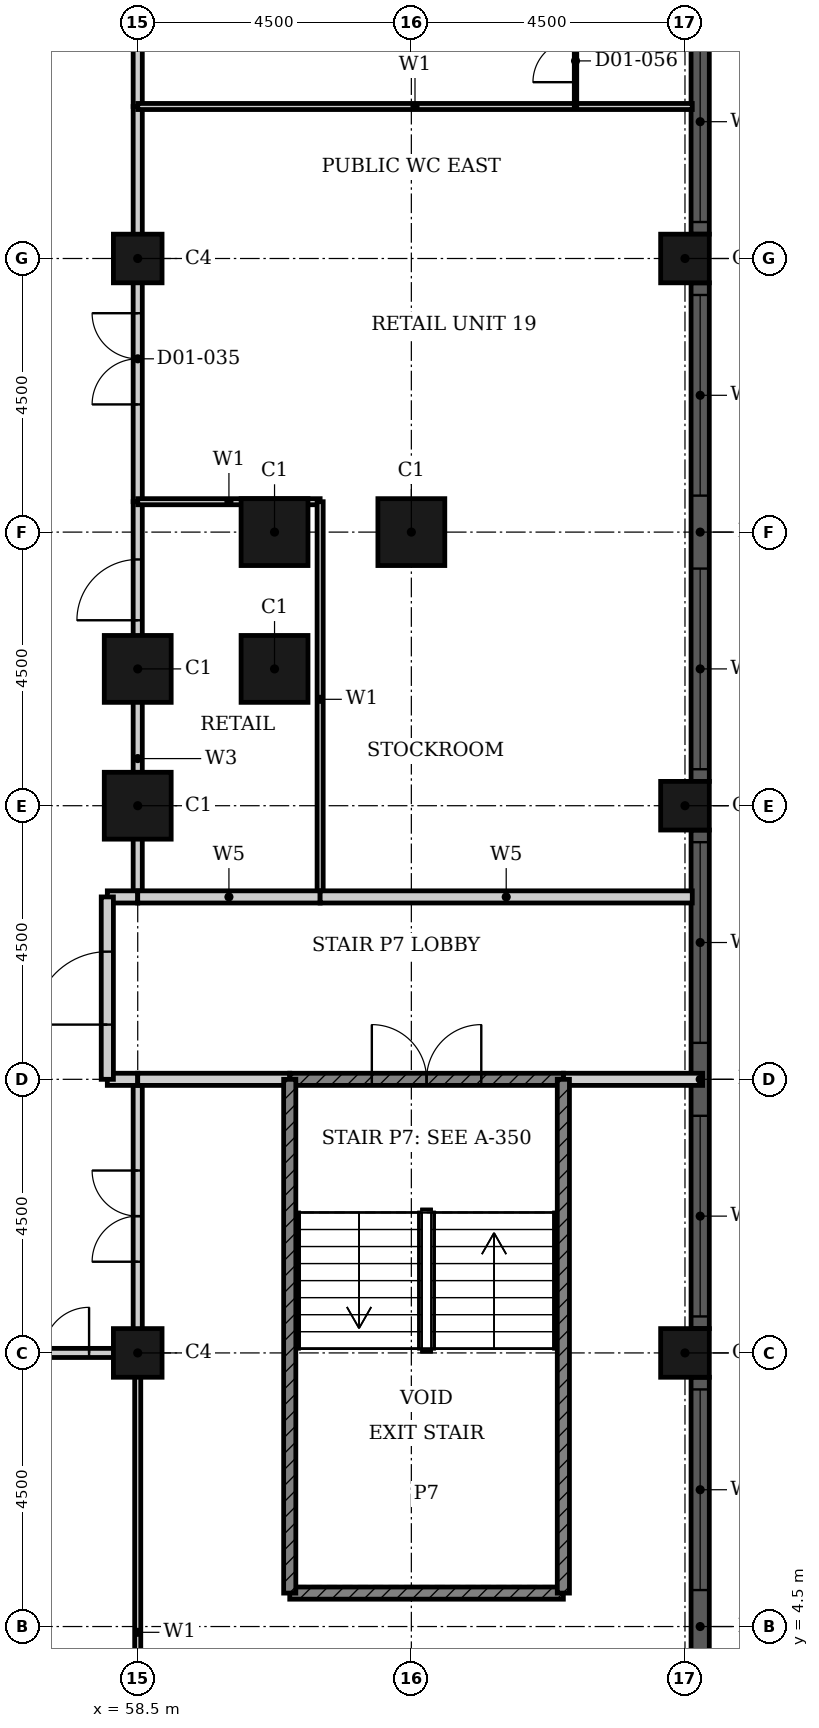
"""IFC4 building model, lengths in metres.
Left out: names, types, materials, properties, quantities, classifications, styles, units other than length and angle.
Written with IfcOpenShell. Run it as: python <this file> out.ifc"""

import sys

from ifc_helpers import new_model, si_unit, direction, frame, frame_2d, origin, origin_2d, place, context, subcontext, project, spatial, rectangle, hollow_rectangle, extrude, element, fill, save


model = new_model("IFC4")
c1 = context("Model", 3, precision=1e-05, world=origin(), true_north=direction((0.0, 1.0)))
c2 = subcontext(c1, "Body", "Model", "MODEL_VIEW")
j1 = project(units=[si_unit("LENGTHUNIT", "METRE"), si_unit("PLANEANGLEUNIT", "RADIAN")], contexts=[c1])
p1 = place(None, origin())
s1 = spatial("IfcSite", under=j1, at=p1, CompositionType="ELEMENT")
p2 = place(p1, origin())
s2 = spatial("IfcBuilding", under=s1, at=p2, CompositionType="ELEMENT")
p3 = place(p2, frame((0.0, 0.0, 6.6)))
s3 = spatial("IfcBuildingStorey", under=s2, at=p3, CompositionType="ELEMENT", Elevation=6.6)
for number, where, z_axis, x_axis in (
    (1, (58.5, 18.0, 0.0), (0.0, 0.0, 1.0), (1.0, 0.0, 0.0)),
    (2, (58.5, 20.25, 0.0), (0.0, 0.0, 1.0), (1.0, 0.0, 0.0)),
    (3, (60.75, 20.25, 0.0), (0.0, 0.0, 1.0), (1.0, 0.0, 0.0)),
    (4, (60.75, 22.5, 0.0), (0.0, 0.0, 1.0), (1.0, 0.0, 0.0)),
    (5, (63.0, 22.5, 0.0), (0.0, 0.0, 1.0), (1.0, 0.0, 0.0)),
):
    element("IfcColumn", number, at=place(p3, frame(where, z_axis=z_axis, x_axis=x_axis)), inside=s3, PredefinedType="COLUMN", context=c2, shape_type="SweptSolid", body=[
        extrude(hollow_rectangle(XDim=1.1, YDim=1.1, WallThickness=0.036, at=origin_2d()), origin(), (0.0, 0.0, 1.0), 5.4),
    ])
for number, where, z_axis, x_axis in (
    (6, (67.5, 9.0, 0.0), (0.0, 0.0, 1.0), (1.0, 0.0, 0.0)),
    (7, (67.5, 18.0, 0.0), (0.0, 0.0, 1.0), (1.0, 0.0, 0.0)),
    (8, (67.5, 27.0, 0.0), (0.0, 0.0, 1.0), (1.0, 0.0, 0.0)),
    (9, (58.5, 9.0, 0.0), (0.0, 0.0, 1.0), (1.0, 0.0, 0.0)),
    (10, (58.5, 27.0, 0.0), (0.0, 0.0, 1.0), (1.0, 0.0, 0.0)),
):
    element("IfcColumn", number, at=place(p3, frame(where, z_axis=z_axis, x_axis=x_axis)), inside=s3, PredefinedType="COLUMN", context=c2, shape_type="SweptSolid", body=[
        extrude(hollow_rectangle(XDim=0.8, YDim=0.8, WallThickness=0.025, at=origin_2d()), origin(), (0.0, 0.0, 1.0), 5.4),
    ])
p4 = place(p3, frame((67.75, 0.4, 0.0), z_axis=(0.0, 0.0, 1.0), x_axis=(0.0, 1.0, 0.0)))
e11 = element("IfcWall", 11, at=p4, inside=s3, PredefinedType="SOLIDWALL", context=c2, shape_type="SweptSolid", body=[
    extrude(rectangle(XDim=8.2, YDim=0.3, at=frame_2d((4.1, 0.0))), origin(), (0.0, 0.0, 1.0), 5.4),
])
p5 = place(p4, frame((0.2, 0.0, 0.9)))
e12 = element("IfcOpeningElement", 12, at=p5, cuts=e11, PredefinedType="OPENING", context=c2, shape_type="SweptSolid", body=[
    extrude(rectangle(XDim=3.3, YDim=3.5, at=frame_2d((1.65, 1.75))), frame((0.0, 0.16, 0.0), z_axis=(0.0, -1.0, 0.0), x_axis=(1.0, 0.0, 0.0)), (0.0, 0.0, 1.0), 0.32),
])
p6 = place(p4, frame((4.7, 0.0, 0.9)))
e13 = element("IfcOpeningElement", 13, at=p6, cuts=e11, PredefinedType="OPENING", context=c2, shape_type="SweptSolid", body=[
    extrude(rectangle(XDim=3.3, YDim=3.5, at=frame_2d((1.65, 1.75))), frame((0.0, 0.16, 0.0), z_axis=(0.0, -1.0, 0.0), x_axis=(1.0, 0.0, 0.0)), (0.0, 0.0, 1.0), 0.32),
])
p7 = place(p3, frame((67.75, 9.4, 0.0), z_axis=(0.0, 0.0, 1.0), x_axis=(0.0, 1.0, 0.0)))
e14 = element("IfcWall", 14, at=p7, inside=s3, PredefinedType="SOLIDWALL", context=c2, shape_type="SweptSolid", body=[
    extrude(rectangle(XDim=8.2, YDim=0.3, at=frame_2d((4.1, 0.0))), origin(), (0.0, 0.0, 1.0), 5.4),
])
p8 = place(p7, frame((0.2, 0.0, 0.9)))
e15 = element("IfcOpeningElement", 15, at=p8, cuts=e14, PredefinedType="OPENING", context=c2, shape_type="SweptSolid", body=[
    extrude(rectangle(XDim=3.3, YDim=3.5, at=frame_2d((1.65, 1.75))), frame((0.0, 0.16, 0.0), z_axis=(0.0, -1.0, 0.0), x_axis=(1.0, 0.0, 0.0)), (0.0, 0.0, 1.0), 0.32),
])
p9 = place(p7, frame((4.7, 0.0, 0.9)))
e16 = element("IfcOpeningElement", 16, at=p9, cuts=e14, PredefinedType="OPENING", context=c2, shape_type="SweptSolid", body=[
    extrude(rectangle(XDim=3.3, YDim=3.5, at=frame_2d((1.65, 1.75))), frame((0.0, 0.16, 0.0), z_axis=(0.0, -1.0, 0.0), x_axis=(1.0, 0.0, 0.0)), (0.0, 0.0, 1.0), 0.32),
])
p10 = place(p3, frame((67.75, 18.4, 0.0), z_axis=(0.0, 0.0, 1.0), x_axis=(0.0, 1.0, 0.0)))
e17 = element("IfcWall", 17, at=p10, inside=s3, PredefinedType="SOLIDWALL", context=c2, shape_type="SweptSolid", body=[
    extrude(rectangle(XDim=8.2, YDim=0.3, at=frame_2d((4.1, 0.0))), origin(), (0.0, 0.0, 1.0), 5.4),
])
p11 = place(p10, frame((0.2, 0.0, 0.9)))
e18 = element("IfcOpeningElement", 18, at=p11, cuts=e17, PredefinedType="OPENING", context=c2, shape_type="SweptSolid", body=[
    extrude(rectangle(XDim=3.3, YDim=3.5, at=frame_2d((1.65, 1.75))), frame((0.0, 0.16, 0.0), z_axis=(0.0, -1.0, 0.0), x_axis=(1.0, 0.0, 0.0)), (0.0, 0.0, 1.0), 0.32),
])
p12 = place(p10, frame((4.7, 0.0, 0.9)))
e19 = element("IfcOpeningElement", 19, at=p12, cuts=e17, PredefinedType="OPENING", context=c2, shape_type="SweptSolid", body=[
    extrude(rectangle(XDim=3.3, YDim=3.5, at=frame_2d((1.65, 1.75))), frame((0.0, 0.16, 0.0), z_axis=(0.0, -1.0, 0.0), x_axis=(1.0, 0.0, 0.0)), (0.0, 0.0, 1.0), 0.32),
])
p13 = place(p3, frame((67.75, 27.4, 0.0), z_axis=(0.0, 0.0, 1.0), x_axis=(0.0, 1.0, 0.0)))
e20 = element("IfcWall", 20, at=p13, inside=s3, PredefinedType="SOLIDWALL", context=c2, shape_type="SweptSolid", body=[
    extrude(rectangle(XDim=8.2, YDim=0.3, at=frame_2d((4.1, 0.0))), origin(), (0.0, 0.0, 1.0), 5.4),
])
p14 = place(p13, frame((0.2, 0.0, 0.9)))
e21 = element("IfcOpeningElement", 21, at=p14, cuts=e20, PredefinedType="OPENING", context=c2, shape_type="SweptSolid", body=[
    extrude(rectangle(XDim=3.3, YDim=3.5, at=frame_2d((1.65, 1.75))), frame((0.0, 0.16, 0.0), z_axis=(0.0, -1.0, 0.0), x_axis=(1.0, 0.0, 0.0)), (0.0, 0.0, 1.0), 0.32),
])
p15 = place(p13, frame((4.7, 0.0, 0.9)))
e22 = element("IfcOpeningElement", 22, at=p15, cuts=e20, PredefinedType="OPENING", context=c2, shape_type="SweptSolid", body=[
    extrude(rectangle(XDim=3.3, YDim=3.5, at=frame_2d((1.65, 1.75))), frame((0.0, 0.16, 0.0), z_axis=(0.0, -1.0, 0.0), x_axis=(1.0, 0.0, 0.0)), (0.0, 0.0, 1.0), 0.32),
])
p16 = place(p3, frame((55.4, 9.0, 0.0), z_axis=(0.0, 0.0, 1.0), x_axis=(1.0, 0.0, 0.0)))
e23 = element("IfcWall", 23, at=p16, inside=s3, PredefinedType="PARTITIONING", context=c2, shape_type="SweptSolid", body=[
    extrude(rectangle(XDim=3.1, YDim=0.15, at=frame_2d((1.55, 0.0))), origin(), (0.0, 0.0, 1.0), 5.05),
])
p17 = place(p16, frame((0.8, 0.0, 0.0)))
e24 = element("IfcOpeningElement", 24, at=p17, cuts=e23, PredefinedType="OPENING", context=c2, shape_type="SweptSolid", body=[
    extrude(rectangle(XDim=1.5, YDim=2.4, at=frame_2d((0.75, 1.2))), frame((0.0, 0.085, 0.0), z_axis=(0.0, -1.0, 0.0), x_axis=(1.0, 0.0, 0.0)), (0.0, 0.0, 1.0), 0.17),
])
p18 = place(p3, frame((58.5, 16.5, 0.0), z_axis=(0.0, 0.0, 1.0), x_axis=(0.0, 1.0, 0.0)))
e25 = element("IfcWall", 25, at=p18, inside=s3, PredefinedType="PARTITIONING", context=c2, shape_type="SweptSolid", body=[
    extrude(rectangle(XDim=6.5, YDim=0.15, at=frame_2d((3.25, 0.0))), origin(), (0.0, 0.0, 1.0), 5.05),
])
p19 = place(p18, frame((4.55, 0.0, 0.0)))
e26 = element("IfcOpeningElement", 26, at=p19, cuts=e25, PredefinedType="OPENING", context=c2, shape_type="SweptSolid", body=[
    extrude(rectangle(XDim=1.0, YDim=2.1, at=frame_2d((0.5, 1.05))), frame((0.0, 0.085, 0.0), z_axis=(0.0, -1.0, 0.0), x_axis=(1.0, 0.0, 0.0)), (0.0, 0.0, 1.0), 0.17),
])
p20 = place(p3, frame((58.5, 9.0, 0.0), z_axis=(0.0, 0.0, 1.0), x_axis=(0.0, 1.0, 0.0)))
e27 = element("IfcWall", 27, at=p20, inside=s3, PredefinedType="PARTITIONING", context=c2, shape_type="SweptSolid", body=[
    extrude(rectangle(XDim=4.5, YDim=0.15, at=frame_2d((2.25, 0.0))), origin(), (0.0, 0.0, 1.0), 5.05),
])
p21 = place(p20, frame((1.5, 0.0, 0.0)))
e28 = element("IfcOpeningElement", 28, at=p21, cuts=e27, PredefinedType="OPENING", context=c2, shape_type="SweptSolid", body=[
    extrude(rectangle(XDim=1.5, YDim=2.4, at=frame_2d((0.75, 1.2))), frame((0.0, 0.085, 0.0), z_axis=(0.0, -1.0, 0.0), x_axis=(1.0, 0.0, 0.0)), (0.0, 0.0, 1.0), 0.17),
])
p22 = place(p3, frame((58.5, 23.0, 0.0), z_axis=(0.0, 0.0, 1.0), x_axis=(0.0, 1.0, 0.0)))
e29 = element("IfcWall", 29, at=p22, inside=s3, PredefinedType="PARTITIONING", context=c2, shape_type="SweptSolid", body=[
    extrude(rectangle(XDim=6.5, YDim=0.15, at=frame_2d((3.25, 0.0))), origin(), (0.0, 0.0, 1.0), 5.05),
])
p23 = place(p22, frame((1.6, 0.0, 0.0)))
e30 = element("IfcOpeningElement", 30, at=p23, cuts=e29, PredefinedType="OPENING", context=c2, shape_type="SweptSolid", body=[
    extrude(rectangle(XDim=1.5, YDim=2.4, at=frame_2d((0.75, 1.2))), frame((0.0, 0.085, 0.0), z_axis=(0.0, -1.0, 0.0), x_axis=(1.0, 0.0, 0.0)), (0.0, 0.0, 1.0), 0.17),
])
p24 = place(p3, frame((58.5, 29.5, 0.0), z_axis=(0.0, 0.0, 1.0), x_axis=(0.0, 1.0, 0.0)))
e31 = element("IfcWall", 31, at=p24, inside=s3, PredefinedType="PARTITIONING", context=c2, shape_type="SweptSolid", body=[
    extrude(rectangle(XDim=4.5, YDim=0.15, at=frame_2d((2.25, 0.0))), origin(), (0.0, 0.0, 1.0), 5.05),
])
p25 = place(p3, frame((58.5, 23.0, 0.0), z_axis=(0.0, 0.0, 1.0), x_axis=(1.0, 0.0, 0.0)))
e32 = element("IfcWall", 32, at=p25, inside=s3, PredefinedType="PARTITIONING", context=c2, shape_type="SweptSolid", body=[
    extrude(rectangle(XDim=3.0, YDim=0.1, at=frame_2d((1.5, 0.0))), origin(), (0.0, 0.0, 1.0), 5.05),
])
p26 = place(p3, frame((58.5, 29.5, 0.0), z_axis=(0.0, 0.0, 1.0), x_axis=(1.0, 0.0, 0.0)))
e33 = element("IfcWall", 33, at=p26, inside=s3, PredefinedType="PARTITIONING", context=c2, shape_type="SweptSolid", body=[
    extrude(rectangle(XDim=9.12, YDim=0.1, at=frame_2d((4.56, 0.0))), origin(), (0.0, 0.0, 1.0), 5.05),
])
p27 = place(p3, frame((58.5, -0.19, 0.0), z_axis=(0.0, 0.0, 1.0), x_axis=(0.0, 1.0, 0.0)))
e34 = element("IfcWall", 34, at=p27, inside=s3, PredefinedType="PARTITIONING", context=c2, shape_type="SweptSolid", body=[
    extrude(rectangle(XDim=9.19, YDim=0.1, at=frame_2d((4.595, 0.0))), origin(), (0.0, 0.0, 1.0), 5.05),
])
p28 = place(p3, frame((61.5, 16.5, 0.0), z_axis=(0.0, 0.0, 1.0), x_axis=(0.0, 1.0, 0.0)))
e35 = element("IfcWall", 35, at=p28, inside=s3, PredefinedType="PARTITIONING", context=c2, shape_type="SweptSolid", body=[
    extrude(rectangle(XDim=6.5, YDim=0.1, at=frame_2d((3.25, 0.0))), origin(), (0.0, 0.0, 1.0), 5.05),
])
p29 = place(p3, frame((58.0, 13.5, 0.0), z_axis=(0.0, 0.0, 1.0), x_axis=(1.0, 0.0, 0.0)))
e36 = element("IfcWall", 36, at=p29, inside=s3, PredefinedType="PARTITIONING", context=c2, shape_type="SweptSolid", body=[
    extrude(rectangle(XDim=0.5, YDim=0.2, at=frame_2d((0.25, 0.0))), origin(), (0.0, 0.0, 1.0), 5.05),
])
p30 = place(p3, frame((58.5, 13.5, 0.0), z_axis=(0.0, 0.0, 1.0), x_axis=(1.0, 0.0, 0.0)))
e37 = element("IfcWall", 37, at=p30, inside=s3, PredefinedType="PARTITIONING", context=c2, shape_type="SweptSolid", body=[
    extrude(rectangle(XDim=2.5, YDim=0.2, at=frame_2d((1.25, 0.0))), origin(), (0.0, 0.0, 1.0), 5.05),
])
p31 = place(p3, frame((65.5, 13.5, 0.0), z_axis=(0.0, 0.0, 1.0), x_axis=(1.0, 0.0, 0.0)))
e38 = element("IfcWall", 38, at=p31, inside=s3, PredefinedType="PARTITIONING", context=c2, shape_type="SweptSolid", body=[
    extrude(rectangle(XDim=2.29, YDim=0.2, at=frame_2d((1.145, 0.0))), origin(), (0.0, 0.0, 1.0), 5.05),
])
p32 = place(p3, frame((58.0, 16.5, 0.0), z_axis=(0.0, 0.0, 1.0), x_axis=(1.0, 0.0, 0.0)))
e39 = element("IfcWall", 39, at=p32, inside=s3, PredefinedType="PARTITIONING", context=c2, shape_type="SweptSolid", body=[
    extrude(rectangle(XDim=0.5, YDim=0.2, at=frame_2d((0.25, 0.0))), origin(), (0.0, 0.0, 1.0), 5.05),
])
p33 = place(p3, frame((58.5, 16.5, 0.0), z_axis=(0.0, 0.0, 1.0), x_axis=(1.0, 0.0, 0.0)))
e40 = element("IfcWall", 40, at=p33, inside=s3, PredefinedType="PARTITIONING", context=c2, shape_type="SweptSolid", body=[
    extrude(rectangle(XDim=3.0, YDim=0.2, at=frame_2d((1.5, 0.0))), origin(), (0.0, 0.0, 1.0), 5.05),
])
p34 = place(p3, frame((61.5, 16.5, 0.0), z_axis=(0.0, 0.0, 1.0), x_axis=(1.0, 0.0, 0.0)))
e41 = element("IfcWall", 41, at=p34, inside=s3, PredefinedType="PARTITIONING", context=c2, shape_type="SweptSolid", body=[
    extrude(rectangle(XDim=6.12, YDim=0.2, at=frame_2d((3.06, 0.0))), origin(), (0.0, 0.0, 1.0), 5.05),
])
p35 = place(p3, frame((58.0, 13.5, 0.0), z_axis=(0.0, 0.0, 1.0), x_axis=(0.0, 1.0, 0.0)))
e42 = element("IfcWall", 42, at=p35, inside=s3, PredefinedType="PARTITIONING", context=c2, shape_type="SweptSolid", body=[
    extrude(rectangle(XDim=3.0, YDim=0.2, at=frame_2d((1.5, 0.0))), origin(), (0.0, 0.0, 1.0), 5.05),
])
p36 = place(p35, frame((0.9, 0.0, 0.0)))
e43 = element("IfcOpeningElement", 43, at=p36, cuts=e42, PredefinedType="OPENING", context=c2, shape_type="SweptSolid", body=[
    extrude(rectangle(XDim=1.2, YDim=2.1, at=frame_2d((0.6, 1.05))), frame((0.0, 0.11, 0.0), z_axis=(0.0, -1.0, 0.0), x_axis=(1.0, 0.0, 0.0)), (0.0, 0.0, 1.0), 0.22),
])
p37 = place(p3, frame((61.0, 13.5, 0.0), z_axis=(0.0, 0.0, 1.0), x_axis=(1.0, 0.0, 0.0)))
e44 = element("IfcWall", 44, at=p37, inside=s3, PredefinedType="SHEAR", context=c2, shape_type="SweptSolid", body=[
    extrude(rectangle(XDim=4.5, YDim=0.2, at=frame_2d((2.25, 0.0))), origin(), (0.0, 0.0, 1.0), 5.05),
])
p38 = place(p37, frame((1.35, 0.0, 0.0)))
e45 = element("IfcOpeningElement", 45, at=p38, cuts=e44, PredefinedType="OPENING", context=c2, shape_type="SweptSolid", body=[
    extrude(rectangle(XDim=1.8, YDim=2.1, at=frame_2d((0.9, 1.05))), frame((0.0, 0.11, 0.0), z_axis=(0.0, -1.0, 0.0), x_axis=(1.0, 0.0, 0.0)), (0.0, 0.0, 1.0), 0.22),
])
p39 = place(p3, frame((61.0, 5.05, 0.0), z_axis=(0.0, 0.0, 1.0), x_axis=(1.0, 0.0, 0.0)))
e46 = element("IfcWall", 46, at=p39, inside=s3, PredefinedType="SHEAR", context=c2, shape_type="SweptSolid", body=[
    extrude(rectangle(XDim=4.5, YDim=0.2, at=frame_2d((2.25, 0.0))), origin(), (0.0, 0.0, 1.0), 5.05),
])
for number, where, z_axis, x_axis in (
    (47, (61.0, 5.05, 0.0), (0.0, 0.0, 1.0), (0.0, 1.0, 0.0)),
    (48, (65.5, 5.05, 0.0), (0.0, 0.0, 1.0), (0.0, 1.0, 0.0)),
):
    element("IfcWall", number, at=place(p3, frame(where, z_axis=z_axis, x_axis=x_axis)), inside=s3, PredefinedType="SHEAR", context=c2, shape_type="SweptSolid", body=[
        extrude(rectangle(XDim=8.45, YDim=0.2, at=frame_2d((4.225, 0.0))), origin(), (0.0, 0.0, 1.0), 5.05),
    ])
p40 = place(p3, frame((65.7, 29.5, 0.0), z_axis=(0.0, 0.0, 1.0), x_axis=(0.0, 1.0, 0.0)))
e49 = element("IfcWall", 49, at=p40, inside=s3, PredefinedType="PARTITIONING", context=c2, shape_type="SweptSolid", body=[
    extrude(rectangle(XDim=4.5, YDim=0.04, at=frame_2d((2.25, 0.0))), origin(), (0.0, 0.0, 1.0), 5.05),
])
p41 = place(p40, frame((0.4, 0.0, 0.0)))
e50 = element("IfcOpeningElement", 50, at=p41, cuts=e49, PredefinedType="OPENING", context=c2, shape_type="SweptSolid", body=[
    extrude(rectangle(XDim=0.7, YDim=2.0, at=frame_2d((0.35, 1.0))), frame((0.0, 0.03, 0.0), z_axis=(0.0, -1.0, 0.0), x_axis=(1.0, 0.0, 0.0)), (0.0, 0.0, 1.0), 0.06),
])
p42 = place(p40, frame((1.9, 0.0, 0.0)))
e51 = element("IfcOpeningElement", 51, at=p42, cuts=e49, PredefinedType="OPENING", context=c2, shape_type="SweptSolid", body=[
    extrude(rectangle(XDim=0.7, YDim=2.0, at=frame_2d((0.35, 1.0))), frame((0.0, 0.03, 0.0), z_axis=(0.0, -1.0, 0.0), x_axis=(1.0, 0.0, 0.0)), (0.0, 0.0, 1.0), 0.06),
])
p43 = place(p40, frame((3.3, 0.0, 0.0)))
e52 = element("IfcOpeningElement", 52, at=p43, cuts=e49, PredefinedType="OPENING", context=c2, shape_type="SweptSolid", body=[
    extrude(rectangle(XDim=0.9, YDim=2.0, at=frame_2d((0.45, 1.0))), frame((0.0, 0.03, 0.0), z_axis=(0.0, -1.0, 0.0), x_axis=(1.0, 0.0, 0.0)), (0.0, 0.0, 1.0), 0.06),
])
p44 = place(p6, origin())
e53 = element("IfcWindow", 53, at=p44, inside=s3, PartitioningType="SINGLE_PANEL", PredefinedType="WINDOW", context=c2, shape_type="SweptSolid", body=[
    extrude(rectangle(XDim=3.3, YDim=3.5, at=frame_2d((1.65, 1.75))), frame((0.0, 0.03, 0.0), z_axis=(0.0, -1.0, 0.0), x_axis=(1.0, 0.0, 0.0)), (0.0, 0.0, 1.0), 0.06),
])
fill(e13, e53)
p45 = place(p8, origin())
e54 = element("IfcWindow", 54, at=p45, inside=s3, PartitioningType="SINGLE_PANEL", PredefinedType="WINDOW", context=c2, shape_type="SweptSolid", body=[
    extrude(rectangle(XDim=3.3, YDim=3.5, at=frame_2d((1.65, 1.75))), frame((0.0, 0.03, 0.0), z_axis=(0.0, -1.0, 0.0), x_axis=(1.0, 0.0, 0.0)), (0.0, 0.0, 1.0), 0.06),
])
fill(e15, e54)
p46 = place(p9, origin())
e55 = element("IfcWindow", 55, at=p46, inside=s3, PartitioningType="SINGLE_PANEL", PredefinedType="WINDOW", context=c2, shape_type="SweptSolid", body=[
    extrude(rectangle(XDim=3.3, YDim=3.5, at=frame_2d((1.65, 1.75))), frame((0.0, 0.03, 0.0), z_axis=(0.0, -1.0, 0.0), x_axis=(1.0, 0.0, 0.0)), (0.0, 0.0, 1.0), 0.06),
])
fill(e16, e55)
p47 = place(p11, origin())
e56 = element("IfcWindow", 56, at=p47, inside=s3, PartitioningType="SINGLE_PANEL", PredefinedType="WINDOW", context=c2, shape_type="SweptSolid", body=[
    extrude(rectangle(XDim=3.3, YDim=3.5, at=frame_2d((1.65, 1.75))), frame((0.0, 0.03, 0.0), z_axis=(0.0, -1.0, 0.0), x_axis=(1.0, 0.0, 0.0)), (0.0, 0.0, 1.0), 0.06),
])
fill(e18, e56)
p48 = place(p12, origin())
e57 = element("IfcWindow", 57, at=p48, inside=s3, PartitioningType="SINGLE_PANEL", PredefinedType="WINDOW", context=c2, shape_type="SweptSolid", body=[
    extrude(rectangle(XDim=3.3, YDim=3.5, at=frame_2d((1.65, 1.75))), frame((0.0, 0.03, 0.0), z_axis=(0.0, -1.0, 0.0), x_axis=(1.0, 0.0, 0.0)), (0.0, 0.0, 1.0), 0.06),
])
fill(e19, e57)
p49 = place(p14, origin())
e58 = element("IfcWindow", 58, at=p49, inside=s3, PartitioningType="SINGLE_PANEL", PredefinedType="WINDOW", context=c2, shape_type="SweptSolid", body=[
    extrude(rectangle(XDim=3.3, YDim=3.5, at=frame_2d((1.65, 1.75))), frame((0.0, 0.03, 0.0), z_axis=(0.0, -1.0, 0.0), x_axis=(1.0, 0.0, 0.0)), (0.0, 0.0, 1.0), 0.06),
])
fill(e21, e58)
p50 = place(p36, origin())
e59 = element("IfcDoor", 59, at=p50, inside=s3, OperationType="SINGLE_SWING_RIGHT", PredefinedType="DOOR", context=c2, shape_type="SweptSolid", body=[
    extrude(rectangle(XDim=1.2, YDim=2.1, at=frame_2d((0.6, 1.05))), frame((0.0, 0.025, 0.0), z_axis=(0.0, -1.0, 0.0), x_axis=(1.0, 0.0, 0.0)), (0.0, 0.0, 1.0), 0.05),
])
fill(e43, e59)
p51 = place(p38, origin())
e60 = element("IfcDoor", 60, at=p51, inside=s3, OperationType="DOUBLE_DOOR_SINGLE_SWING", PredefinedType="DOOR", context=c2, shape_type="SweptSolid", body=[
    extrude(rectangle(XDim=1.8, YDim=2.1, at=frame_2d((0.9, 1.05))), frame((0.0, 0.025, 0.0), z_axis=(0.0, -1.0, 0.0), x_axis=(1.0, 0.0, 0.0)), (0.0, 0.0, 1.0), 0.05),
])
fill(e45, e60)
p52 = place(p19, origin())
e61 = element("IfcDoor", 61, at=p52, inside=s3, OperationType="SINGLE_SWING_RIGHT", PredefinedType="DOOR", context=c2, shape_type="SweptSolid", body=[
    extrude(rectangle(XDim=1.0, YDim=2.1, at=frame_2d((0.5, 1.05))), frame((0.0, 0.025, 0.0), z_axis=(0.0, -1.0, 0.0), x_axis=(1.0, 0.0, 0.0)), (0.0, 0.0, 1.0), 0.05),
])
fill(e26, e61)
p53 = place(p21, origin())
e62 = element("IfcDoor", 62, at=p53, inside=s3, OperationType="DOUBLE_DOOR_SINGLE_SWING", PredefinedType="DOOR", context=c2, shape_type="SweptSolid", body=[
    extrude(rectangle(XDim=1.5, YDim=2.4, at=frame_2d((0.75, 1.2))), frame((0.0, 0.025, 0.0), z_axis=(0.0, -1.0, 0.0), x_axis=(1.0, 0.0, 0.0)), (0.0, 0.0, 1.0), 0.05),
])
fill(e28, e62)
p54 = place(p23, origin())
e63 = element("IfcDoor", 63, at=p54, inside=s3, OperationType="DOUBLE_DOOR_SINGLE_SWING", PredefinedType="DOOR", context=c2, shape_type="SweptSolid", body=[
    extrude(rectangle(XDim=1.5, YDim=2.4, at=frame_2d((0.75, 1.2))), frame((0.0, 0.025, 0.0), z_axis=(0.0, -1.0, 0.0), x_axis=(1.0, 0.0, 0.0)), (0.0, 0.0, 1.0), 0.05),
])
fill(e30, e63)
p55 = place(p17, origin())
e64 = element("IfcDoor", 64, at=p55, inside=s3, OperationType="DOUBLE_DOOR_SINGLE_SWING", PredefinedType="DOOR", context=c2, shape_type="SweptSolid", body=[
    extrude(rectangle(XDim=1.5, YDim=2.4, at=frame_2d((0.75, 1.2))), frame((0.0, 0.025, 0.0), z_axis=(0.0, -1.0, 0.0), x_axis=(1.0, 0.0, 0.0)), (0.0, 0.0, 1.0), 0.05),
])
fill(e24, e64)
p56 = place(p41, origin())
e65 = element("IfcDoor", 65, at=p56, inside=s3, OperationType="SINGLE_SWING_LEFT", PredefinedType="DOOR", context=c2, shape_type="SweptSolid", body=[
    extrude(rectangle(XDim=0.7, YDim=2.0, at=frame_2d((0.35, 1.0))), frame((0.0, 0.02, 0.0), z_axis=(0.0, -1.0, 0.0), x_axis=(1.0, 0.0, 0.0)), (0.0, 0.0, 1.0), 0.04),
])
fill(e50, e65)
save(model, sys.argv[1])
